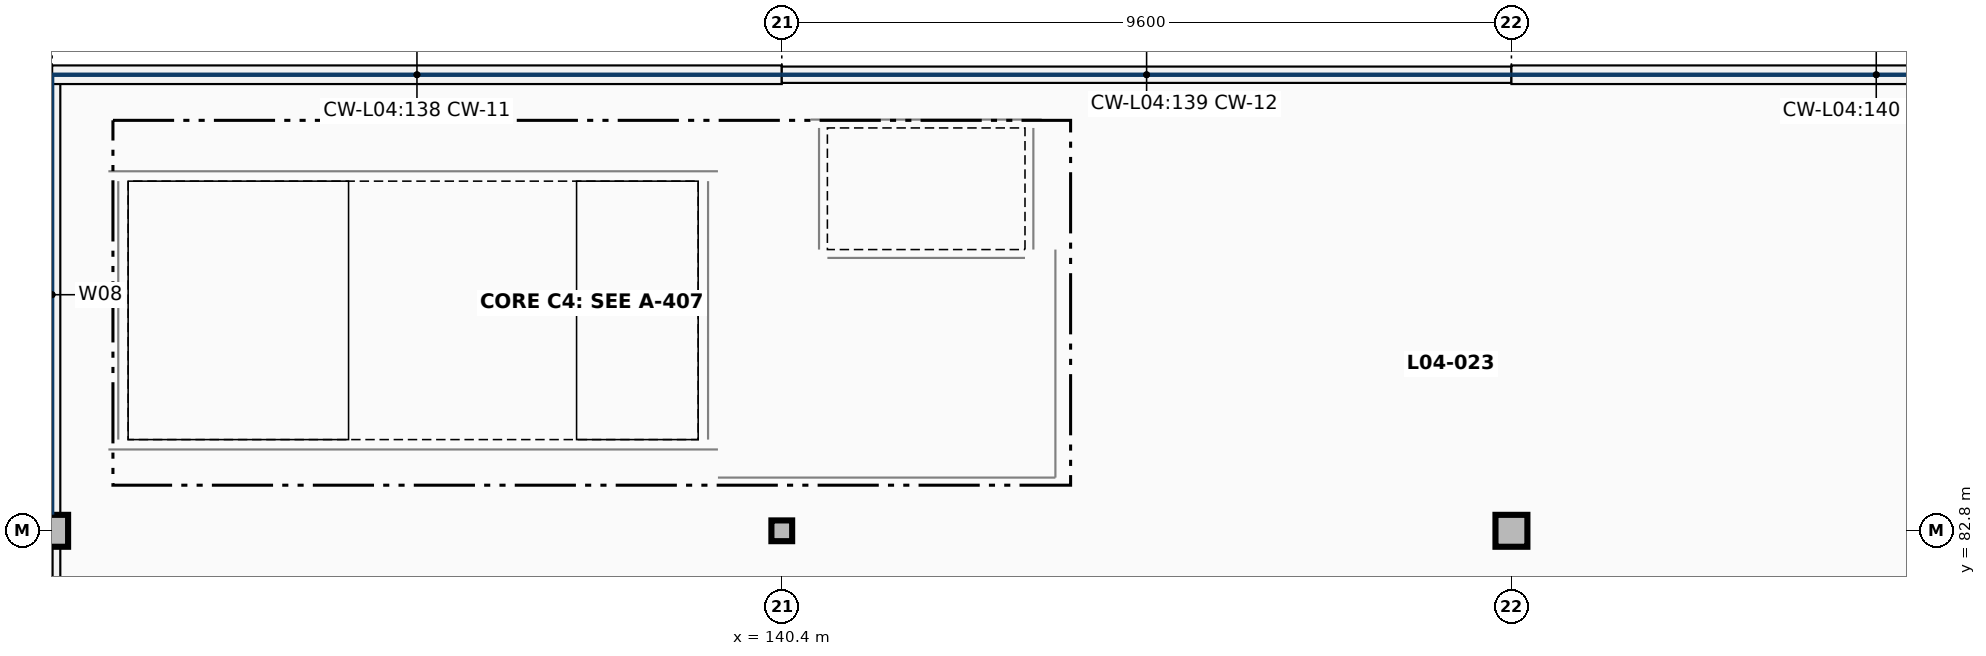
"""IFC4 building model, lengths in metres.
Left out: names, types, materials, properties, quantities, classifications, styles, units other than length and angle.
Written with IfcOpenShell. Run it as: python <this file> out.ifc"""

import sys

from ifc_helpers import new_model, si_unit, direction, frame, frame_2d, origin, origin_2d, place, context, subcontext, project, spatial, rectangle, hollow_circle, extrude, element, fill, save


model = new_model("IFC4")
c1 = context("Model", 3, precision=1e-05, world=origin(), true_north=direction((0.0, 1.0)))
c2 = subcontext(c1, "Body", "Model", "MODEL_VIEW")
j1 = project(units=[si_unit("LENGTHUNIT", "METRE"), si_unit("PLANEANGLEUNIT", "RADIAN")], contexts=[c1])
p1 = place(None, origin())
s1 = spatial("IfcSite", under=j1, at=p1, CompositionType="ELEMENT")
p2 = place(p1, origin())
s2 = spatial("IfcBuilding", under=s1, at=p2, CompositionType="ELEMENT")
p3 = place(p2, frame((0.0, 0.0, 17.34)))
s3 = spatial("IfcBuildingStorey", under=s2, at=p3, CompositionType="ELEMENT", Elevation=17.34)
p4 = place(p3, frame((130.8, 82.8, 0.0), z_axis=(0.0, 0.0, 1.0), x_axis=(1.0, 0.0, 0.0)))
e1 = element("IfcColumn", 1, at=p4, inside=s3, PredefinedType="COLUMN", context=c2, shape_type="SweptSolid", body=[
    extrude(rectangle(XDim=0.42, YDim=0.42, at=origin_2d()), origin(), (0.0, 0.0, 1.0), 3.74),
])
p5 = place(p3, frame((140.4, 82.8, 0.0), z_axis=(0.0, 0.0, 1.0), x_axis=(1.0, 0.0, 0.0)))
e2 = element("IfcColumn", 2, at=p5, inside=s3, PredefinedType="COLUMN", context=c2, shape_type="SweptSolid", body=[
    extrude(hollow_circle(Radius=0.136, WallThickness=0.012, at=origin_2d()), origin(), (0.0, 0.0, 1.0), 3.7),
])
p6 = place(p3, frame((150.0, 82.8, 0.0), z_axis=(0.0, 0.0, 1.0), x_axis=(1.0, 0.0, 0.0)))
e3 = element("IfcColumn", 3, at=p6, inside=s3, PredefinedType="COLUMN", context=c2, shape_type="SweptSolid", body=[
    extrude(rectangle(XDim=0.42, YDim=0.42, at=origin_2d()), origin(), (0.0, 0.0, 1.0), 3.74),
])
p7 = place(p3, frame((130.8, 79.412, 0.0), z_axis=(0.0, 0.0, 1.0), x_axis=(0.0, 1.0, 0.0)))
e4 = element("IfcWall", 4, at=p7, inside=s3, PredefinedType="SOLIDWALL", context=c2, shape_type="SweptSolid", body=[
    extrude(rectangle(XDim=3.176, YDim=0.215, at=frame_2d((1.588, 0.0))), origin(), (0.0, 0.0, 1.0), 2.979),
])
p8 = place(p3, frame((130.8, 83.012, 0.0), z_axis=(0.0, 0.0, 1.0), x_axis=(0.0, 1.0, 0.0)))
e5 = element("IfcWall", 5, at=p8, inside=s3, PredefinedType="SOLIDWALL", context=c2, shape_type="SweptSolid", body=[
    extrude(rectangle(XDim=5.788, YDim=0.215, at=frame_2d((2.894, 0.0))), origin(), (0.0, 0.0, 1.0), 0.85),
])
p9 = place(p3, frame((130.8, 88.8, 0.0), z_axis=(0.0, 0.0, 1.0), x_axis=(1.0, 0.0, 0.0)))
e6 = element("IfcWall", 6, at=p9, inside=s3, PredefinedType="SOLIDWALL", context=c2, shape_type="SweptSolid", body=[
    extrude(rectangle(XDim=9.6, YDim=0.245, at=frame_2d((4.8, 0.0))), origin(), (0.0, 0.0, 1.0), 0.85),
])
p10 = place(p3, frame((140.4, 88.8, 0.0), z_axis=(0.0, 0.0, 1.0), x_axis=(1.0, 0.0, 0.0)))
e7 = element("IfcWall", 7, at=p10, inside=s3, PredefinedType="SOLIDWALL", context=c2, shape_type="SweptSolid", body=[
    extrude(rectangle(XDim=9.6, YDim=0.215, at=frame_2d((4.8, 0.0))), origin(), (0.0, 0.0, 1.0), 0.85),
])
p11 = place(p3, frame((150.0, 88.8, 0.0), z_axis=(0.0, 0.0, 1.0), x_axis=(1.0, 0.0, 0.0)))
e8 = element("IfcWall", 8, at=p11, inside=s3, PredefinedType="SOLIDWALL", context=c2, shape_type="SweptSolid", body=[
    extrude(rectangle(XDim=9.6, YDim=0.245, at=frame_2d((4.8, 0.0))), origin(), (0.0, 0.0, 1.0), 0.85),
])
p12 = place(p3, frame((131.67, 84.0, 0.0), z_axis=(0.0, 0.0, 1.0), x_axis=(0.0, 1.0, 0.0)))
e9 = element("IfcWall", 9, at=p12, inside=s3, PredefinedType="SHEAR", context=c2, shape_type="SweptSolid", body=[
    extrude(rectangle(XDim=3.4, YDim=0.26, at=frame_2d((1.7, 0.0))), origin(), (0.0, 0.0, 1.0), 3.74),
])
for number, where, z_axis, x_axis in (
    (10, (131.54, 83.87, 0.0), (0.0, 0.0, 1.0), (1.0, 0.0, 0.0)),
    (11, (131.54, 87.53, 0.0), (0.0, 0.0, 1.0), (1.0, 0.0, 0.0)),
):
    element("IfcWall", number, at=place(p3, frame(where, z_axis=z_axis, x_axis=x_axis)), inside=s3, PredefinedType="SHEAR", context=c2, shape_type="SweptSolid", body=[
        extrude(rectangle(XDim=8.02, YDim=0.26, at=frame_2d((4.01, 0.0))), origin(), (0.0, 0.0, 1.0), 3.74),
    ])
p13 = place(p3, frame((139.43, 84.0, 0.0), z_axis=(0.0, 0.0, 1.0), x_axis=(0.0, 1.0, 0.0)))
e12 = element("IfcWall", 12, at=p13, inside=s3, PredefinedType="SHEAR", context=c2, shape_type="SweptSolid", body=[
    extrude(rectangle(XDim=3.4, YDim=0.26, at=frame_2d((1.7, 0.0))), origin(), (0.0, 0.0, 1.0), 3.74),
])
p14 = place(p13, frame((0.65, 0.0, 0.0)))
e13 = element("IfcOpeningElement", 13, at=p14, cuts=e12, PredefinedType="OPENING", context=c2, shape_type="SweptSolid", body=[
    extrude(rectangle(XDim=1.2, YDim=2.2, at=frame_2d((0.6, 1.1))), frame((0.0, 0.14, 0.0), z_axis=(0.0, -1.0, 0.0), x_axis=(1.0, 0.0, 0.0)), (0.0, 0.0, 1.0), 0.28),
])
for number, where, z_axis, x_axis in (
    (14, (140.89, 86.5, 0.0), (0.0, 0.0, 1.0), (0.0, 1.0, 0.0)),
    (15, (143.71, 86.5, 0.0), (0.0, 0.0, 1.0), (0.0, 1.0, 0.0)),
):
    element("IfcWall", number, at=place(p3, frame(where, z_axis=z_axis, x_axis=x_axis)), inside=s3, PredefinedType="SHEAR", context=c2, shape_type="SweptSolid", body=[
        extrude(rectangle(XDim=1.6, YDim=0.22, at=frame_2d((0.8, 0.0))), origin(), (0.0, 0.0, 1.0), 3.74),
    ])
p15 = place(p3, frame((140.78, 88.21, 0.0), z_axis=(0.0, 0.0, 1.0), x_axis=(1.0, 0.0, 0.0)))
e16 = element("IfcWall", 16, at=p15, inside=s3, PredefinedType="SHEAR", context=c2, shape_type="SweptSolid", body=[
    extrude(rectangle(XDim=3.04, YDim=0.22, at=frame_2d((1.52, 0.0))), origin(), (0.0, 0.0, 1.0), 3.74),
])
p16 = place(p3, frame((141.0, 86.39, 0.0), z_axis=(0.0, 0.0, 1.0), x_axis=(1.0, 0.0, 0.0)))
e17 = element("IfcWall", 17, at=p16, inside=s3, PredefinedType="SHEAR", context=c2, shape_type="SweptSolid", body=[
    extrude(rectangle(XDim=2.6, YDim=0.22, at=frame_2d((1.3, 0.0))), origin(), (0.0, 0.0, 1.0), 3.74),
])
p17 = place(p16, frame((0.8, 0.0, 0.0)))
e18 = element("IfcOpeningElement", 18, at=p17, cuts=e17, PredefinedType="OPENING", context=c2, shape_type="SweptSolid", body=[
    extrude(rectangle(XDim=1.0, YDim=2.15, at=frame_2d((0.5, 1.075))), frame((0.0, 0.12, 0.0), z_axis=(0.0, -1.0, 0.0), x_axis=(1.0, 0.0, 0.0)), (0.0, 0.0, 1.0), 0.24),
])
p18 = place(p3, frame((144.0, 83.5, 0.0), z_axis=(0.0, 0.0, 1.0), x_axis=(0.0, 1.0, 0.0)))
e19 = element("IfcWall", 19, at=p18, inside=s3, PredefinedType="PARTITIONING", context=c2, shape_type="SweptSolid", body=[
    extrude(rectangle(XDim=3.0, YDim=0.2, at=frame_2d((1.5, 0.0))), origin(), (0.0, 0.0, 1.0), 3.414),
])
p19 = place(p18, frame((0.775, 0.0, 0.0)))
e20 = element("IfcOpeningElement", 20, at=p19, cuts=e19, PredefinedType="OPENING", context=c2, shape_type="SweptSolid", body=[
    extrude(rectangle(XDim=1.45, YDim=2.2, at=frame_2d((0.725, 1.1))), frame((0.0, 0.11, 0.0), z_axis=(0.0, -1.0, 0.0), x_axis=(1.0, 0.0, 0.0)), (0.0, 0.0, 1.0), 0.22),
])
p20 = place(p3, frame((139.56, 83.5, 0.0), z_axis=(0.0, 0.0, 1.0), x_axis=(1.0, 0.0, 0.0)))
e21 = element("IfcWall", 21, at=p20, inside=s3, PredefinedType="PARTITIONING", context=c2, shape_type="SweptSolid", body=[
    extrude(rectangle(XDim=4.44, YDim=0.2, at=frame_2d((2.22, 0.0))), origin(), (0.0, 0.0, 1.0), 3.414),
])
p21 = place(p14, origin())
e22 = element("IfcDoor", 22, at=p21, inside=s3, OperationType="SINGLE_SWING_RIGHT", PredefinedType="DOOR", context=c2, shape_type="SweptSolid", body=[
    extrude(rectangle(XDim=1.2, YDim=2.2, at=frame_2d((0.6, 1.1))), frame((0.0, 0.025, 0.0), z_axis=(0.0, -1.0, 0.0), x_axis=(1.0, 0.0, 0.0)), (0.0, 0.0, 1.0), 0.05),
])
fill(e13, e22)
p22 = place(p17, origin())
e23 = element("IfcDoor", 23, at=p22, inside=s3, OperationType="DOUBLE_DOOR_SLIDING", PredefinedType="DOOR", context=c2, shape_type="SweptSolid", body=[
    extrude(rectangle(XDim=1.0, YDim=2.15, at=frame_2d((0.5, 1.075))), frame((0.0, 0.025, 0.0), z_axis=(0.0, -1.0, 0.0), x_axis=(1.0, 0.0, 0.0)), (0.0, 0.0, 1.0), 0.05),
])
fill(e18, e23)
p23 = place(p19, frame((1.45, 0.0, 0.0), z_axis=(0.0, 0.0, 1.0), x_axis=(-1.0, 0.0, 0.0)))
e24 = element("IfcDoor", 24, at=p23, inside=s3, OperationType="DOUBLE_DOOR_SINGLE_SWING", PredefinedType="DOOR", context=c2, shape_type="SweptSolid", body=[
    extrude(rectangle(XDim=1.45, YDim=2.2, at=frame_2d((0.725, 1.1))), frame((0.0, 0.025, 0.0), z_axis=(0.0, -1.0, 0.0), x_axis=(1.0, 0.0, 0.0)), (0.0, 0.0, 1.0), 0.05),
])
fill(e20, e24)
save(model, sys.argv[1])
